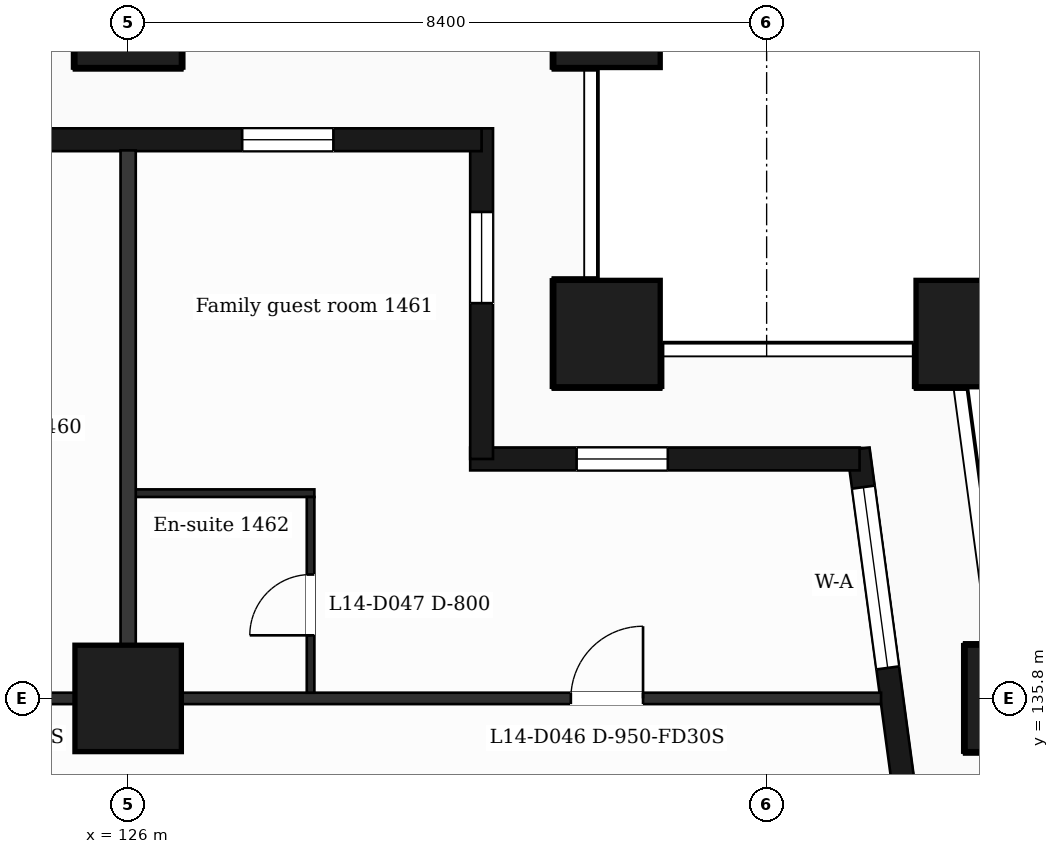
"""IFC4 building model, lengths in metres.
Left out: names, types, materials, properties, quantities, classifications, styles, units other than length and angle.
Written with IfcOpenShell. Run it as: python <this file> out.ifc"""

import sys

from ifc_helpers import new_model, si_unit, direction, frame, frame_2d, origin, origin_2d, place, context, subcontext, project, spatial, rectangle, extrude, element, fill, save


model = new_model("IFC4")
c1 = context("Model", 3, precision=1e-05, world=origin(), true_north=direction((0.0, 1.0)))
c2 = subcontext(c1, "Body", "Model", "MODEL_VIEW")
j1 = project(units=[si_unit("LENGTHUNIT", "METRE"), si_unit("PLANEANGLEUNIT", "RADIAN")], contexts=[c1])
p1 = place(None, origin())
s1 = spatial("IfcSite", under=j1, at=p1, CompositionType="ELEMENT")
p2 = place(p1, origin())
s2 = spatial("IfcBuilding", under=s1, at=p2, CompositionType="ELEMENT")
p3 = place(p2, frame((0.0, 0.0, 67.0)))
s3 = spatial("IfcBuildingStorey", under=s2, at=p3, CompositionType="ELEMENT", Elevation=67.0)
for number, where, z_axis, x_axis in (
    (1, (132.3, 140.6, 0.0), (0.0, 0.0, 1.0), (1.0, 0.0, 0.0)),
    (2, (137.065, 140.6, 0.0), (0.0, 0.0, 1.0), (1.0, 0.0, 0.0)),
    (3, (126.0, 135.8, 0.0), (0.0, 0.0, 1.0), (1.0, 0.0, 0.0)),
    (4, (137.711, 135.8, 0.0), (0.0, 0.0, 1.0), (1.0, 0.0, 0.0)),
    (5, (126.0, 144.8, 0.0), (0.0, 0.0, 1.0), (1.0, 0.0, 0.0)),
    (6, (132.3, 144.8, 0.0), (0.0, 0.0, 1.0), (1.0, 0.0, 0.0)),
):
    element("IfcColumn", number, at=place(p3, frame(where, z_axis=z_axis, x_axis=x_axis)), inside=s3, PredefinedType="COLUMN", context=c2, shape_type="SweptSolid", body=[
        extrude(rectangle(XDim=1.4, YDim=1.4, at=origin_2d()), origin(), (0.0, 0.0, 1.0), 3.5),
    ])
p4 = place(p3, frame((136.504, 132.4, 0.0), z_axis=(0.0, 0.0, 1.0), x_axis=(-0.133399697462, 0.99106231929, 0.0)))
e7 = element("IfcWall", 7, at=p4, inside=s3, PredefinedType="SOLIDWALL", context=c2, shape_type="SweptSolid", body=[
    extrude(rectangle(XDim=6.74, YDim=0.3, at=frame_2d((3.37, 0.0))), origin(), (0.0, 0.0, 1.0), 3.18),
])
p5 = place(p4, frame((1.115, 0.0, 0.0)))
e8 = element("IfcOpeningElement", 8, at=p5, cuts=e7, PredefinedType="OPENING", context=c2, shape_type="SweptSolid", body=[
    extrude(rectangle(XDim=1.2, YDim=2.4, at=frame_2d((0.6, 1.2))), frame((0.0, 0.16, 0.0), z_axis=(0.0, -1.0, 0.0), x_axis=(1.0, 0.0, 0.0)), (0.0, 0.0, 1.0), 0.32),
])
p6 = place(p4, frame((3.835, 0.0, 0.9)))
e9 = element("IfcOpeningElement", 9, at=p6, cuts=e7, PredefinedType="OPENING", context=c2, shape_type="SweptSolid", body=[
    extrude(rectangle(XDim=2.4, YDim=2.1, at=frame_2d((1.2, 1.05))), frame((0.0, 0.16, 0.0), z_axis=(0.0, -1.0, 0.0), x_axis=(1.0, 0.0, 0.0)), (0.0, 0.0, 1.0), 0.32),
])
p7 = place(p3, frame((135.623, 138.95, 0.0), z_axis=(0.0, 0.0, 1.0), x_axis=(-1.0, 0.0, 0.0)))
e10 = element("IfcWall", 10, at=p7, inside=s3, PredefinedType="SOLIDWALL", context=c2, shape_type="SweptSolid", body=[
    extrude(rectangle(XDim=5.123, YDim=0.3, at=frame_2d((2.561, 0.0))), origin(), (0.0, 0.0, 1.0), 3.18),
])
p8 = place(p7, frame((2.523, 0.0, 0.9)))
e11 = element("IfcOpeningElement", 11, at=p8, cuts=e10, PredefinedType="OPENING", context=c2, shape_type="SweptSolid", body=[
    extrude(rectangle(XDim=1.2, YDim=2.1, at=frame_2d((0.6, 1.05))), frame((0.0, 0.16, 0.0), z_axis=(0.0, -1.0, 0.0), x_axis=(1.0, 0.0, 0.0)), (0.0, 0.0, 1.0), 0.32),
])
p9 = place(p3, frame((130.65, 138.95, 0.0), z_axis=(0.0, 0.0, 1.0), x_axis=(0.0, 1.0, 0.0)))
e12 = element("IfcWall", 12, at=p9, inside=s3, PredefinedType="SOLIDWALL", context=c2, shape_type="SweptSolid", body=[
    extrude(rectangle(XDim=4.35, YDim=0.3, at=frame_2d((2.175, 0.0))), origin(), (0.0, 0.0, 1.0), 3.18),
])
p10 = place(p9, frame((2.05, 0.0, 0.9)))
e13 = element("IfcOpeningElement", 13, at=p10, cuts=e12, PredefinedType="OPENING", context=c2, shape_type="SweptSolid", body=[
    extrude(rectangle(XDim=1.2, YDim=2.1, at=frame_2d((0.6, 1.05))), frame((0.0, 0.16, 0.0), z_axis=(0.0, -1.0, 0.0), x_axis=(1.0, 0.0, 0.0)), (0.0, 0.0, 1.0), 0.32),
])
p11 = place(p3, frame((130.65, 143.15, 0.0), z_axis=(0.0, 0.0, 1.0), x_axis=(-1.0, 0.0, 0.0)))
e14 = element("IfcWall", 14, at=p11, inside=s3, PredefinedType="SOLIDWALL", context=c2, shape_type="SweptSolid", body=[
    extrude(rectangle(XDim=16.35, YDim=0.3, at=frame_2d((8.175, 0.0))), origin(), (0.0, 0.0, 1.0), 3.18),
])
p12 = place(p11, frame((1.95, 0.0, 0.9)))
e15 = element("IfcOpeningElement", 15, at=p12, cuts=e14, PredefinedType="OPENING", context=c2, shape_type="SweptSolid", body=[
    extrude(rectangle(XDim=1.2, YDim=2.1, at=frame_2d((0.6, 1.05))), frame((0.0, 0.16, 0.0), z_axis=(0.0, -1.0, 0.0), x_axis=(1.0, 0.0, 0.0)), (0.0, 0.0, 1.0), 0.32),
])
p13 = place(p11, frame((6.15, 0.0, 0.0)))
e16 = element("IfcOpeningElement", 16, at=p13, cuts=e14, PredefinedType="OPENING", context=c2, shape_type="SweptSolid", body=[
    extrude(rectangle(XDim=1.2, YDim=2.4, at=frame_2d((0.6, 1.2))), frame((0.0, 0.16, 0.0), z_axis=(0.0, -1.0, 0.0), x_axis=(1.0, 0.0, 0.0)), (0.0, 0.0, 1.0), 0.32),
])
p14 = place(p11, frame((9.75, 0.0, 0.9)))
e17 = element("IfcOpeningElement", 17, at=p14, cuts=e14, PredefinedType="OPENING", context=c2, shape_type="SweptSolid", body=[
    extrude(rectangle(XDim=2.4, YDim=2.1, at=frame_2d((1.2, 1.05))), frame((0.0, 0.16, 0.0), z_axis=(0.0, -1.0, 0.0), x_axis=(1.0, 0.0, 0.0)), (0.0, 0.0, 1.0), 0.32),
])
p15 = place(p11, frame((13.45, 0.0, 0.9)))
e18 = element("IfcOpeningElement", 18, at=p15, cuts=e14, PredefinedType="OPENING", context=c2, shape_type="SweptSolid", body=[
    extrude(rectangle(XDim=2.4, YDim=2.1, at=frame_2d((1.2, 1.05))), frame((0.0, 0.16, 0.0), z_axis=(0.0, -1.0, 0.0), x_axis=(1.0, 0.0, 0.0)), (0.0, 0.0, 1.0), 0.32),
])
p16 = place(p3, frame((90.895, 135.8, 0.0), z_axis=(0.0, 0.0, 1.0), x_axis=(1.0, 0.0, 0.0)))
e19 = element("IfcWall", 19, at=p16, inside=s3, PredefinedType="PARTITIONING", context=c2, shape_type="SweptSolid", body=[
    extrude(rectangle(XDim=45.011, YDim=0.15, at=frame_2d((22.505, 0.0))), origin(), (0.0, 0.0, 1.0), 3.18),
])
p17 = place(p16, frame((7.068, 0.0, 0.0)))
e20 = element("IfcOpeningElement", 20, at=p17, cuts=e19, PredefinedType="OPENING", context=c2, shape_type="SweptSolid", body=[
    extrude(rectangle(XDim=0.95, YDim=2.1, at=frame_2d((0.475, 1.05))), frame((0.0, 0.085, 0.0), z_axis=(0.0, -1.0, 0.0), x_axis=(1.0, 0.0, 0.0)), (0.0, 0.0, 1.0), 0.17),
])
p18 = place(p16, frame((10.892, 0.0, 0.0)))
e21 = element("IfcOpeningElement", 21, at=p18, cuts=e19, PredefinedType="OPENING", context=c2, shape_type="SweptSolid", body=[
    extrude(rectangle(XDim=0.95, YDim=2.1, at=frame_2d((0.475, 1.05))), frame((0.0, 0.085, 0.0), z_axis=(0.0, -1.0, 0.0), x_axis=(1.0, 0.0, 0.0)), (0.0, 0.0, 1.0), 0.17),
])
p19 = place(p16, frame((16.455, 0.0, 0.0)))
e22 = element("IfcOpeningElement", 22, at=p19, cuts=e19, PredefinedType="OPENING", context=c2, shape_type="SweptSolid", body=[
    extrude(rectangle(XDim=0.95, YDim=2.1, at=frame_2d((0.475, 1.05))), frame((0.0, 0.085, 0.0), z_axis=(0.0, -1.0, 0.0), x_axis=(1.0, 0.0, 0.0)), (0.0, 0.0, 1.0), 0.17),
])
p20 = place(p16, frame((21.918, 0.0, 0.0)))
e23 = element("IfcOpeningElement", 23, at=p20, cuts=e19, PredefinedType="OPENING", context=c2, shape_type="SweptSolid", body=[
    extrude(rectangle(XDim=0.95, YDim=2.1, at=frame_2d((0.475, 1.05))), frame((0.0, 0.085, 0.0), z_axis=(0.0, -1.0, 0.0), x_axis=(1.0, 0.0, 0.0)), (0.0, 0.0, 1.0), 0.17),
])
p21 = place(p16, frame((28.969, 0.0, 0.0)))
e24 = element("IfcOpeningElement", 24, at=p21, cuts=e19, PredefinedType="OPENING", context=c2, shape_type="SweptSolid", body=[
    extrude(rectangle(XDim=0.95, YDim=2.1, at=frame_2d((0.475, 1.05))), frame((0.0, 0.085, 0.0), z_axis=(0.0, -1.0, 0.0), x_axis=(1.0, 0.0, 0.0)), (0.0, 0.0, 1.0), 0.17),
])
p22 = place(p16, frame((32.531, 0.0, 0.0)))
e25 = element("IfcOpeningElement", 25, at=p22, cuts=e19, PredefinedType="OPENING", context=c2, shape_type="SweptSolid", body=[
    extrude(rectangle(XDim=0.95, YDim=2.1, at=frame_2d((0.475, 1.05))), frame((0.0, 0.085, 0.0), z_axis=(0.0, -1.0, 0.0), x_axis=(1.0, 0.0, 0.0)), (0.0, 0.0, 1.0), 0.17),
])
p23 = place(p16, frame((40.929, 0.0, 0.0)))
e26 = element("IfcOpeningElement", 26, at=p23, cuts=e19, PredefinedType="OPENING", context=c2, shape_type="SweptSolid", body=[
    extrude(rectangle(XDim=0.95, YDim=2.1, at=frame_2d((0.475, 1.05))), frame((0.0, 0.085, 0.0), z_axis=(0.0, -1.0, 0.0), x_axis=(1.0, 0.0, 0.0)), (0.0, 0.0, 1.0), 0.17),
])
p24 = place(p3, frame((126.0, 138.5, 0.0), z_axis=(0.0, 0.0, 1.0), x_axis=(1.0, 0.0, 0.0)))
e27 = element("IfcWall", 27, at=p24, inside=s3, PredefinedType="PARTITIONING", context=c2, shape_type="SweptSolid", body=[
    extrude(rectangle(XDim=2.45, YDim=0.1, at=frame_2d((1.225, 0.0))), origin(), (0.0, 0.0, 1.0), 3.18),
])
p25 = place(p3, frame((126.0, 135.875, 0.0), z_axis=(0.0, 0.0, 1.0), x_axis=(0.0, 1.0, 0.0)))
e28 = element("IfcWall", 28, at=p25, inside=s3, PredefinedType="PARTITIONING", context=c2, shape_type="SweptSolid", body=[
    extrude(rectangle(XDim=7.135, YDim=0.2, at=frame_2d((3.567, 0.0))), origin(), (0.0, 0.0, 1.0), 3.18),
])
p26 = place(p3, frame((128.4, 135.875, 0.0), z_axis=(0.0, 0.0, 1.0), x_axis=(0.0, 1.0, 0.0)))
e29 = element("IfcWall", 29, at=p26, inside=s3, PredefinedType="PARTITIONING", context=c2, shape_type="SweptSolid", body=[
    extrude(rectangle(XDim=2.575, YDim=0.1, at=frame_2d((1.288, 0.0))), origin(), (0.0, 0.0, 1.0), 3.18),
])
p27 = place(p26, frame((0.755, 0.0, 0.0)))
e30 = element("IfcOpeningElement", 30, at=p27, cuts=e29, PredefinedType="OPENING", context=c2, shape_type="SweptSolid", body=[
    extrude(rectangle(XDim=0.8, YDim=2.1, at=frame_2d((0.4, 1.05))), frame((0.0, 0.06, 0.0), z_axis=(0.0, -1.0, 0.0), x_axis=(1.0, 0.0, 0.0)), (0.0, 0.0, 1.0), 0.12),
])
p28 = place(p6, origin())
e31 = element("IfcWindow", 31, at=p28, inside=s3, PartitioningType="SINGLE_PANEL", PredefinedType="WINDOW", context=c2, shape_type="SweptSolid", body=[
    extrude(rectangle(XDim=2.4, YDim=2.1, at=frame_2d((1.2, 1.05))), frame((0.0, 0.03, 0.0), z_axis=(0.0, -1.0, 0.0), x_axis=(1.0, 0.0, 0.0)), (0.0, 0.0, 1.0), 0.06),
])
fill(e9, e31)
p29 = place(p8, origin())
e32 = element("IfcWindow", 32, at=p29, inside=s3, PartitioningType="SINGLE_PANEL", PredefinedType="WINDOW", context=c2, shape_type="SweptSolid", body=[
    extrude(rectangle(XDim=1.2, YDim=2.1, at=frame_2d((0.6, 1.05))), frame((0.0, 0.03, 0.0), z_axis=(0.0, -1.0, 0.0), x_axis=(1.0, 0.0, 0.0)), (0.0, 0.0, 1.0), 0.06),
])
fill(e11, e32)
p30 = place(p10, origin())
e33 = element("IfcWindow", 33, at=p30, inside=s3, PartitioningType="SINGLE_PANEL", PredefinedType="WINDOW", context=c2, shape_type="SweptSolid", body=[
    extrude(rectangle(XDim=1.2, YDim=2.1, at=frame_2d((0.6, 1.05))), frame((0.0, 0.03, 0.0), z_axis=(0.0, -1.0, 0.0), x_axis=(1.0, 0.0, 0.0)), (0.0, 0.0, 1.0), 0.06),
])
fill(e13, e33)
p31 = place(p12, origin())
e34 = element("IfcWindow", 34, at=p31, inside=s3, PartitioningType="SINGLE_PANEL", PredefinedType="WINDOW", context=c2, shape_type="SweptSolid", body=[
    extrude(rectangle(XDim=1.2, YDim=2.1, at=frame_2d((0.6, 1.05))), frame((0.0, 0.03, 0.0), z_axis=(0.0, -1.0, 0.0), x_axis=(1.0, 0.0, 0.0)), (0.0, 0.0, 1.0), 0.06),
])
fill(e15, e34)
p32 = place(p23, origin())
e35 = element("IfcDoor", 35, at=p32, inside=s3, OperationType="SINGLE_SWING_RIGHT", PredefinedType="DOOR", context=c2, shape_type="SweptSolid", body=[
    extrude(rectangle(XDim=0.95, YDim=2.1, at=frame_2d((0.475, 1.05))), frame((0.0, 0.025, 0.0), z_axis=(0.0, -1.0, 0.0), x_axis=(1.0, 0.0, 0.0)), (0.0, 0.0, 1.0), 0.05),
])
fill(e26, e35)
p33 = place(p27, origin())
e36 = element("IfcDoor", 36, at=p33, inside=s3, OperationType="SINGLE_SWING_LEFT", PredefinedType="DOOR", context=c2, shape_type="SweptSolid", body=[
    extrude(rectangle(XDim=0.8, YDim=2.1, at=frame_2d((0.4, 1.05))), frame((0.0, 0.025, 0.0), z_axis=(0.0, -1.0, 0.0), x_axis=(1.0, 0.0, 0.0)), (0.0, 0.0, 1.0), 0.05),
])
fill(e30, e36)
save(model, sys.argv[1])
